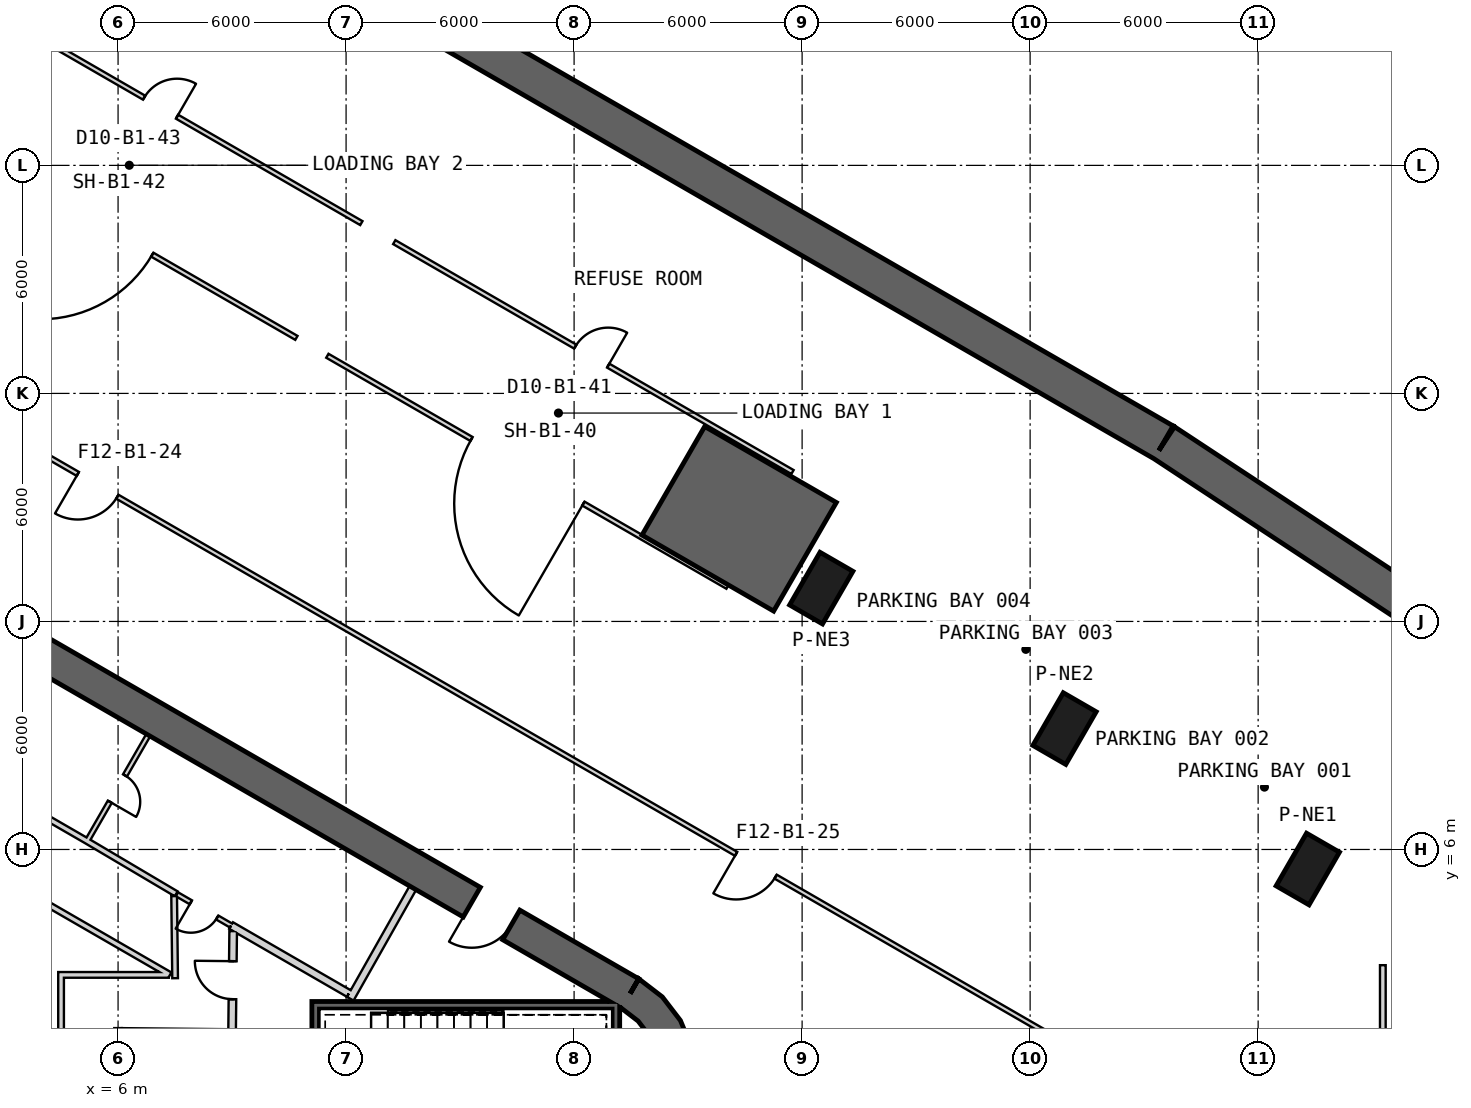
"""IFC4 building model, lengths in metres.
Left out: names, types, materials, properties, quantities, classifications, styles, units other than length and angle.
Written with IfcOpenShell. Run it as: python <this file> out.ifc"""

import sys

from ifc_helpers import new_model, si_unit, direction, frame, frame_2d, origin, origin_2d, place, context, subcontext, project, spatial, polyline, rectangle, outline, extrude, element, fill, save


model = new_model("IFC4")
c1 = context("Model", 3, precision=1e-05, world=origin(), true_north=direction((0.0, 1.0)))
c2 = subcontext(c1, "Body", "Model", "MODEL_VIEW")
j1 = project(units=[si_unit("LENGTHUNIT", "METRE"), si_unit("PLANEANGLEUNIT", "RADIAN")], contexts=[c1])
p1 = place(None, origin())
s1 = spatial("IfcSite", under=j1, at=p1, CompositionType="ELEMENT")
p2 = place(p1, origin())
s2 = spatial("IfcBuilding", under=s1, at=p2, CompositionType="ELEMENT")
p3 = place(p2, frame((0.0, 0.0, -5.5)))
s3 = spatial("IfcBuildingStorey", under=s2, at=p3, CompositionType="ELEMENT", Elevation=-5.5)
p4 = place(p3, frame((-2.547, 37.518, 0.0), z_axis=(0.0, 0.0, 1.0), x_axis=(0.866165180358, -0.499757821684, 0.0)))
e1 = element("IfcWall", 1, at=p4, inside=s3, PredefinedType="SHEAR", context=c2, shape_type="SweptSolid", body=[
    extrude(rectangle(XDim=41.631, YDim=1.0, at=frame_2d((20.815, 0.0))), origin(), (0.0, 0.0, 1.0), 5.5),
])
p5 = place(p3, frame((33.525, 16.705, 0.0), z_axis=(0.0, 0.0, 1.0), x_axis=(0.834958566613, -0.550312812898, 0.0)))
e2 = element("IfcWall", 2, at=p5, inside=s3, PredefinedType="SHEAR", context=c2, shape_type="SweptSolid", body=[
    extrude(rectangle(XDim=14.086, YDim=1.0, at=frame_2d((7.043, 0.0))), origin(), (0.0, 0.0, 1.0), 5.5),
])
for number, where, z_axis, x_axis in (
    (3, (37.306, 5.485, 0.0), (0.0, 0.0, 1.0), (0.5, 0.866, 0.0)),
    (4, (30.905, 9.181, 0.0), (0.0, 0.0, 1.0), (0.5, 0.866, 0.0)),
    (5, (24.504, 12.876, 0.0), (0.0, 0.0, 1.0), (0.5, 0.866, 0.0)),
):
    element("IfcColumn", number, at=place(p3, frame(where, z_axis=z_axis, x_axis=x_axis)), inside=s3, PredefinedType="COLUMN", context=c2, shape_type="SweptSolid", body=[
        extrude(rectangle(XDim=1.6, YDim=1.0, at=origin_2d()), origin(), (0.0, 0.0, 1.0), 5.5),
    ])
p6 = place(p3, frame((19.475, 2.208, 0.0), z_axis=(0.0, 0.0, 1.0), x_axis=(-0.866028369851, 0.499994862586, 0.0)))
e6 = element("IfcWall", 6, at=p6, inside=s3, PredefinedType="SHEAR", context=c2, shape_type="SweptSolid", body=[
    extrude(rectangle(XDim=31.523, YDim=0.9, at=frame_2d((15.762, 0.0))), origin(), (0.0, 0.0, 1.0), 5.5),
])
p7 = place(p6, frame((3.612, 0.0, 0.0)))
e7 = element("IfcOpeningElement", 7, at=p7, cuts=e6, PredefinedType="OPENING", context=c2, shape_type="SweptSolid", body=[
    extrude(rectangle(XDim=1.2, YDim=2.4, at=frame_2d((0.6, 1.2))), frame((0.0, 0.46, 0.0), z_axis=(0.0, -1.0, 0.0), x_axis=(1.0, 0.0, 0.0)), (0.0, 0.0, 1.0), 0.92),
])
p8 = place(p6, frame((26.712, 0.0, 0.0)))
e8 = element("IfcOpeningElement", 8, at=p8, cuts=e6, PredefinedType="OPENING", context=c2, shape_type="SweptSolid", body=[
    extrude(rectangle(XDim=1.2, YDim=2.4, at=frame_2d((0.6, 1.2))), frame((0.0, 0.46, 0.0), z_axis=(0.0, -1.0, 0.0), x_axis=(1.0, 0.0, 0.0)), (0.0, 0.0, 1.0), 0.92),
])
p9 = place(p3, origin())
e9 = element("IfcWall", 9, at=p9, inside=s3, PredefinedType="SHEAR", context=c2, shape_type="SweptSolid", body=[
    extrude(outline(polyline([(19.7, -2.598), (20.321, -2.121), (20.798, -1.5), (21.098, -0.777), (21.2, 0.0), (21.098, 0.777), (20.798, 1.5), (20.321, 2.121), (19.7, 2.598), (19.25, 1.819), (19.685, 1.485), (20.019, 1.05), (20.229, 0.543), (20.3, 0.0), (20.229, -0.543), (20.019, -1.05), (19.685, -1.485), (19.25, -1.819), (19.7, -2.598)])), origin(), (0.0, 0.0, 1.0), 5.5),
])
p10 = place(p3, origin())
e10 = element("IfcWall", 10, at=p10, inside=s3, PredefinedType="SHEAR", context=c2, shape_type="SweptSolid", body=[
    extrude(outline(polyline([(24.901, 15.13), (21.437, 17.13), (19.787, 14.272), (23.251, 12.272), (24.901, 15.13)])), origin(), (0.0, 0.0, 1.0), 5.5),
])
p11 = place(p3, frame((19.2, 1.9, -0.4), z_axis=(0.0, 0.0, 1.0), x_axis=(-1.0, 0.0, 0.0)))
e11 = element("IfcWall", 11, at=p11, inside=s3, PredefinedType="SHEAR", context=c2, shape_type="SweptSolid", body=[
    extrude(rectangle(XDim=8.1, YDim=0.2, at=frame_2d((4.05, 0.0))), origin(), (0.0, 0.0, 1.0), 5.5),
])
p12 = place(p3, frame((19.1, -2.0, -0.4), z_axis=(0.0, 0.0, 1.0), x_axis=(0.0, 1.0, 0.0)))
e12 = element("IfcWall", 12, at=p12, inside=s3, PredefinedType="SHEAR", context=c2, shape_type="SweptSolid", body=[
    extrude(rectangle(XDim=3.8, YDim=0.2, at=frame_2d((1.9, 0.0))), origin(), (0.0, 0.0, 1.0), 5.5),
])
p13 = place(p3, frame((11.2, -1.8, -0.4), z_axis=(0.0, 0.0, 1.0), x_axis=(0.0, 1.0, 0.0)))
e13 = element("IfcWall", 13, at=p13, inside=s3, PredefinedType="SHEAR", context=c2, shape_type="SweptSolid", body=[
    extrude(rectangle(XDim=3.6, YDim=0.2, at=frame_2d((1.8, 0.0))), origin(), (0.0, 0.0, 1.0), 5.5),
])
p14 = place(p13, frame((1.25, 0.0, 0.4)))
e14 = element("IfcOpeningElement", 14, at=p14, cuts=e13, PredefinedType="OPENING", context=c2, shape_type="SweptSolid", body=[
    extrude(rectangle(XDim=1.1, YDim=2.1, at=frame_2d((0.55, 1.05))), frame((0.0, 0.11, 0.0), z_axis=(0.0, -1.0, 0.0), x_axis=(1.0, 0.0, 0.0)), (0.0, 0.0, 1.0), 0.22),
])
p15 = place(p3, frame((6.0, -1.1, 0.0), z_axis=(0.0, 0.0, 1.0), x_axis=(0.0, 1.0, 0.0)))
e15 = element("IfcWall", 15, at=p15, inside=s3, PredefinedType="PLUMBINGWALL", context=c2, shape_type="SweptSolid", body=[
    extrude(rectangle(XDim=2.4, YDim=0.2, at=frame_2d((1.2, 0.0))), origin(), (0.0, 0.0, 1.0), 5.1),
])
p16 = place(p3, frame((9.1, 1.169, 0.0), z_axis=(0.0, 0.0, 1.0), x_axis=(-0.99994990606, 0.010009264196, 0.0)))
e16 = element("IfcWall", 16, at=p16, inside=s3, PredefinedType="PLUMBINGWALL", context=c2, shape_type="SweptSolid", body=[
    extrude(rectangle(XDim=3.0, YDim=0.2, at=frame_2d((1.5, 0.0))), origin(), (0.0, 0.0, 1.0), 5.1),
])
p17 = place(p3, frame((6.795, 9.01, 0.0), z_axis=(0.0, 0.0, 1.0), x_axis=(-0.499984717929, -0.866034226713, 0.0)))
e17 = element("IfcWall", 17, at=p17, inside=s3, PredefinedType="PARTITIONING", context=c2, shape_type="SweptSolid", body=[
    extrude(rectangle(XDim=3.25, YDim=0.12, at=frame_2d((1.625, 0.0))), origin(), (0.0, 0.0, 1.0), 5.1),
])
p18 = place(p17, frame((1.225, 0.0, 0.0)))
e18 = element("IfcOpeningElement", 18, at=p18, cuts=e17, PredefinedType="OPENING", context=c2, shape_type="SweptSolid", body=[
    extrude(rectangle(XDim=0.8, YDim=2.1, at=frame_2d((0.4, 1.05))), frame((0.0, 0.07, 0.0), z_axis=(0.0, -1.0, 0.0), x_axis=(1.0, 0.0, 0.0)), (0.0, 0.0, 1.0), 0.14),
])
p19 = place(p3, frame((12.11, 2.073, 0.0), z_axis=(0.0, 0.0, 1.0), x_axis=(0.49196600604, 0.870614408852, 0.0)))
e19 = element("IfcWall", 19, at=p19, inside=s3, PredefinedType="PARTITIONING", context=c2, shape_type="SweptSolid", body=[
    extrude(rectangle(XDim=3.35, YDim=0.2, at=frame_2d((1.675, 0.0))), origin(), (0.0, 0.0, 1.0), 5.1),
])
p20 = place(p3, frame((8.974, 3.999, 0.0), z_axis=(0.0, 0.0, 1.0), x_axis=(0.86601284211, -0.500021756827, 0.0)))
e20 = element("IfcWall", 20, at=p20, inside=s3, PredefinedType="PARTITIONING", context=c2, shape_type="SweptSolid", body=[
    extrude(rectangle(XDim=3.577, YDim=0.2, at=frame_2d((1.789, 0.0))), origin(), (0.0, 0.0, 1.0), 5.1),
])
p21 = place(p3, frame((5.159, 6.236, 0.0), z_axis=(0.0, 0.0, 1.0), x_axis=(0.860550523279, -0.509365091938, 0.0)))
e21 = element("IfcWall", 21, at=p21, inside=s3, PredefinedType="PLUMBINGWALL", context=c2, shape_type="SweptSolid", body=[
    extrude(rectangle(XDim=2.755, YDim=0.15, at=frame_2d((1.377, 0.0))), origin(), (0.0, 0.0, 1.0), 5.1),
])
p22 = place(p3, frame((7.55, 4.821, 0.0), z_axis=(0.0, 0.0, 1.0), x_axis=(0.866069384335, -0.499923815713, 0.0)))
e22 = element("IfcWall", 22, at=p22, inside=s3, PredefinedType="PARTITIONING", context=c2, shape_type="SweptSolid", body=[
    extrude(rectangle(XDim=1.644, YDim=0.12, at=frame_2d((0.822, 0.0))), origin(), (0.0, 0.0, 1.0), 5.1),
])
p23 = place(p22, frame((0.422, 0.0, 0.0)))
e23 = element("IfcOpeningElement", 23, at=p23, cuts=e22, PredefinedType="OPENING", context=c2, shape_type="SweptSolid", body=[
    extrude(rectangle(XDim=0.8, YDim=2.1, at=frame_2d((0.4, 1.05))), frame((0.0, 0.07, 0.0), z_axis=(0.0, -1.0, 0.0), x_axis=(1.0, 0.0, 0.0)), (0.0, 0.0, 1.0), 0.14),
])
p24 = place(p3, frame((5.159, 6.236, 0.0), z_axis=(0.0, 0.0, 1.0), x_axis=(-0.866028230842, 0.499995103361, 0.0)))
e24 = element("IfcWall", 24, at=p24, inside=s3, PredefinedType="PLUMBINGWALL", context=c2, shape_type="SweptSolid", body=[
    extrude(rectangle(XDim=5.4, YDim=0.15, at=frame_2d((2.7, 0.0))), origin(), (0.0, 0.0, 1.0), 5.1),
])
p25 = place(p24, frame((2.3, 0.0, 0.0)))
e25 = element("IfcOpeningElement", 25, at=p25, cuts=e24, PredefinedType="OPENING", context=c2, shape_type="SweptSolid", body=[
    extrude(rectangle(XDim=0.8, YDim=2.1, at=frame_2d((0.4, 1.05))), frame((0.0, 0.085, 0.0), z_axis=(0.0, -1.0, 0.0), x_axis=(1.0, 0.0, 0.0)), (0.0, 0.0, 1.0), 0.17),
])
p26 = place(p3, frame((9.001, 1.27, 0.0), z_axis=(0.0, 0.0, 1.0), x_axis=(0.010780534828, 0.999941888346, 0.0)))
e26 = element("IfcWall", 26, at=p26, inside=s3, PredefinedType="PARTITIONING", context=c2, shape_type="SweptSolid", body=[
    extrude(rectangle(XDim=2.582, YDim=0.2, at=frame_2d((1.291, 0.0))), origin(), (0.0, 0.0, 1.0), 5.1),
])
p27 = place(p26, frame((0.791, 0.0, 0.0)))
e27 = element("IfcOpeningElement", 27, at=p27, cuts=e26, PredefinedType="OPENING", context=c2, shape_type="SweptSolid", body=[
    extrude(rectangle(XDim=1.0, YDim=2.1, at=frame_2d((0.5, 1.05))), frame((0.0, 0.11, 0.0), z_axis=(0.0, -1.0, 0.0), x_axis=(1.0, 0.0, 0.0)), (0.0, 0.0, 1.0), 0.22),
])
p28 = place(p3, frame((7.367, 2.7, 0.0), z_axis=(0.0, 0.0, 1.0), x_axis=(-0.866027158831, 0.499996960157, 0.0)))
e28 = element("IfcWall", 28, at=p28, inside=s3, PredefinedType="PLUMBINGWALL", context=c2, shape_type="SweptSolid", body=[
    extrude(rectangle(XDim=10.06, YDim=0.15, at=frame_2d((5.03, 0.0))), origin(), (0.0, 0.0, 1.0), 5.1),
])
p29 = place(p3, frame((7.501, 2.613, 0.0), z_axis=(0.0, 0.0, 1.0), x_axis=(-0.011734691853, 0.999931146133, 0.0)))
e29 = element("IfcWall", 29, at=p29, inside=s3, PredefinedType="PLUMBINGWALL", context=c2, shape_type="SweptSolid", body=[
    extrude(rectangle(XDim=2.164, YDim=0.15, at=frame_2d((1.082, 0.0))), origin(), (0.0, 0.0, 1.0), 5.1),
])
p30 = place(p3, frame((4.425, 2.7, 0.0), z_axis=(0.0, 0.0, 1.0), x_axis=(1.0, 0.0, 0.0)))
e30 = element("IfcWall", 30, at=p30, inside=s3, PredefinedType="PLUMBINGWALL", context=c2, shape_type="SweptSolid", body=[
    extrude(rectangle(XDim=2.912, YDim=0.15, at=frame_2d((1.456, 0.0))), origin(), (0.0, 0.0, 1.0), 5.1),
])
p31 = place(p3, frame((4.5, 0.85, 0.0), z_axis=(0.0, 0.0, 1.0), x_axis=(0.0, 1.0, 0.0)))
e31 = element("IfcWall", 31, at=p31, inside=s3, PredefinedType="PLUMBINGWALL", context=c2, shape_type="SweptSolid", body=[
    extrude(rectangle(XDim=1.775, YDim=0.15, at=frame_2d((0.887, 0.0))), origin(), (0.0, 0.0, 1.0), 5.1),
])
p32 = place(p3, frame((32.38, 0.046, 0.0), z_axis=(0.0, 0.0, 1.0), x_axis=(-0.86611360534, 0.499847199298, 0.0)))
e32 = element("IfcWall", 32, at=p32, inside=s3, PredefinedType="PARTITIONING", context=c2, shape_type="SweptSolid", body=[
    extrude(rectangle(XDim=56.078, YDim=0.12, at=frame_2d((28.039, 0.0))), origin(), (0.0, 0.0, 1.0), 4.07),
])
p33 = place(p32, frame((30.481, 0.0, 0.0)))
e33 = element("IfcOpeningElement", 33, at=p33, cuts=e32, PredefinedType="OPENING", context=c2, shape_type="SweptSolid", body=[
    extrude(rectangle(XDim=1.2, YDim=2.4, at=frame_2d((0.6, 1.2))), frame((0.0, 0.07, 0.0), z_axis=(0.0, -1.0, 0.0), x_axis=(1.0, 0.0, 0.0)), (0.0, 0.0, 1.0), 0.14),
])
p34 = place(p32, frame((10.481, 0.0, 0.0)))
e34 = element("IfcOpeningElement", 34, at=p34, cuts=e32, PredefinedType="OPENING", context=c2, shape_type="SweptSolid", body=[
    extrude(rectangle(XDim=1.2, YDim=2.4, at=frame_2d((0.6, 1.2))), frame((0.0, 0.07, 0.0), z_axis=(0.0, -1.0, 0.0), x_axis=(1.0, 0.0, 0.0)), (0.0, 0.0, 1.0), 0.14),
])
p35 = place(p32, frame((45.282, 0.0, 0.0)))
e35 = element("IfcOpeningElement", 35, at=p35, cuts=e32, PredefinedType="OPENING", context=c2, shape_type="SweptSolid", body=[
    extrude(rectangle(XDim=0.9, YDim=2.1, at=frame_2d((0.45, 1.05))), frame((0.0, 0.07, 0.0), z_axis=(0.0, -1.0, 0.0), x_axis=(1.0, 0.0, 0.0)), (0.0, 0.0, 1.0), 0.14),
])
p36 = place(p32, frame((52.061, 0.0, 0.0)))
e36 = element("IfcOpeningElement", 36, at=p36, cuts=e32, PredefinedType="OPENING", context=c2, shape_type="SweptSolid", body=[
    extrude(rectangle(XDim=1.0, YDim=2.1, at=frame_2d((0.5, 1.05))), frame((0.0, 0.07, 0.0), z_axis=(0.0, -1.0, 0.0), x_axis=(1.0, 0.0, 0.0)), (0.0, 0.0, 1.0), 0.14),
])
p37 = place(p3, frame((39.281, -2.955, 0.0), z_axis=(0.0, 0.0, 1.0), x_axis=(0.0, 1.0, 0.0)))
e37 = element("IfcWall", 37, at=p37, inside=s3, PredefinedType="PLUMBINGWALL", context=c2, shape_type="SweptSolid", body=[
    extrude(rectangle(XDim=5.911, YDim=0.15, at=frame_2d((2.955, 0.0))), origin(), (0.0, 0.0, 1.0), 4.07),
])
p38 = place(p37, frame((0.583, 0.0, 0.0)))
e38 = element("IfcOpeningElement", 38, at=p38, cuts=e37, PredefinedType="OPENING", context=c2, shape_type="SweptSolid", body=[
    extrude(rectangle(XDim=0.8, YDim=2.1, at=frame_2d((0.4, 1.05))), frame((0.0, 0.085, 0.0), z_axis=(0.0, -1.0, 0.0), x_axis=(1.0, 0.0, 0.0)), (0.0, 0.0, 1.0), 0.17),
])
p39 = place(p3, frame((22.038, 12.911, 0.0), z_axis=(0.0, 0.0, 1.0), x_axis=(-0.866020417952, 0.500008635616, 0.0)))
e39 = element("IfcWall", 39, at=p39, inside=s3, PredefinedType="PARTITIONING", context=c2, shape_type="SweptSolid", body=[
    extrude(rectangle(XDim=12.16, YDim=0.12, at=frame_2d((6.08, 0.0))), origin(), (0.0, 0.0, 1.0), 5.1),
])
p40 = place(p39, frame((4.38, 0.0, 0.0)))
e40 = element("IfcOpeningElement", 40, at=p40, cuts=e39, PredefinedType="OPENING", context=c2, shape_type="SweptSolid", body=[
    extrude(rectangle(XDim=3.4, YDim=4.0, at=frame_2d((1.7, 2.0))), frame((0.0, 0.07, 0.0), z_axis=(0.0, -1.0, 0.0), x_axis=(1.0, 0.0, 0.0)), (0.0, 0.0, 1.0), 0.14),
])
p41 = place(p3, frame((10.693, 19.461, 0.0), z_axis=(0.0, 0.0, 1.0), x_axis=(-0.866020417952, 0.500008635616, 0.0)))
e41 = element("IfcWall", 41, at=p41, inside=s3, PredefinedType="PARTITIONING", context=c2, shape_type="SweptSolid", body=[
    extrude(rectangle(XDim=12.16, YDim=0.12, at=frame_2d((6.08, 0.0))), origin(), (0.0, 0.0, 1.0), 5.1),
])
p42 = place(p41, frame((4.38, 0.0, 0.0)))
e42 = element("IfcOpeningElement", 42, at=p42, cuts=e41, PredefinedType="OPENING", context=c2, shape_type="SweptSolid", body=[
    extrude(rectangle(XDim=3.4, YDim=4.0, at=frame_2d((1.7, 2.0))), frame((0.0, 0.07, 0.0), z_axis=(0.0, -1.0, 0.0), x_axis=(1.0, 0.0, 0.0)), (0.0, 0.0, 1.0), 0.14),
])
p43 = place(p3, frame((1.923, 28.531, 0.0), z_axis=(0.0, 0.0, 1.0), x_axis=(0.866034387366, -0.499984439657, 0.0)))
e43 = element("IfcWall", 43, at=p43, inside=s3, PredefinedType="PARTITIONING", context=c2, shape_type="SweptSolid", body=[
    extrude(rectangle(XDim=12.1, YDim=0.12, at=frame_2d((6.05, 0.0))), origin(), (0.0, 0.0, 1.0), 5.1),
])
p44 = place(p43, frame((5.5, 0.0, 0.0)))
e44 = element("IfcOpeningElement", 44, at=p44, cuts=e43, PredefinedType="OPENING", context=c2, shape_type="SweptSolid", body=[
    extrude(rectangle(XDim=1.0, YDim=2.1, at=frame_2d((0.5, 1.05))), frame((0.0, 0.07, 0.0), z_axis=(0.0, -1.0, 0.0), x_axis=(1.0, 0.0, 0.0)), (0.0, 0.0, 1.0), 0.14),
])
p45 = place(p3, frame((13.268, 21.981, 0.0), z_axis=(0.0, 0.0, 1.0), x_axis=(0.866020606328, -0.500008309346, 0.0)))
e45 = element("IfcWall", 45, at=p45, inside=s3, PredefinedType="PARTITIONING", context=c2, shape_type="SweptSolid", body=[
    extrude(rectangle(XDim=12.1, YDim=0.12, at=frame_2d((6.05, 0.0))), origin(), (0.0, 0.0, 1.0), 5.1),
])
p46 = place(p45, frame((5.5, 0.0, 0.0)))
e46 = element("IfcOpeningElement", 46, at=p46, cuts=e45, PredefinedType="OPENING", context=c2, shape_type="SweptSolid", body=[
    extrude(rectangle(XDim=1.0, YDim=2.1, at=frame_2d((0.5, 1.05))), frame((0.0, 0.07, 0.0), z_axis=(0.0, -1.0, 0.0), x_axis=(1.0, 0.0, 0.0)), (0.0, 0.0, 1.0), 0.14),
])
p47 = place(p27, origin())
e47 = element("IfcDoor", 47, at=p47, inside=s3, OperationType="SINGLE_SWING_RIGHT", PredefinedType="USERDEFINED", context=c2, shape_type="SweptSolid", body=[
    extrude(rectangle(XDim=1.0, YDim=2.1, at=frame_2d((0.5, 1.05))), frame((0.0, 0.025, 0.0), z_axis=(0.0, -1.0, 0.0), x_axis=(1.0, 0.0, 0.0)), (0.0, 0.0, 1.0), 0.05),
])
fill(e27, e47)
p48 = place(p23, origin())
e48 = element("IfcDoor", 48, at=p48, inside=s3, OperationType="SINGLE_SWING_LEFT", PredefinedType="USERDEFINED", context=c2, shape_type="SweptSolid", body=[
    extrude(rectangle(XDim=0.8, YDim=2.1, at=frame_2d((0.4, 1.05))), frame((0.0, 0.025, 0.0), z_axis=(0.0, -1.0, 0.0), x_axis=(1.0, 0.0, 0.0)), (0.0, 0.0, 1.0), 0.05),
])
fill(e23, e48)
p49 = place(p33, origin())
e49 = element("IfcDoor", 49, at=p49, inside=s3, OperationType="SINGLE_SWING_RIGHT", PredefinedType="USERDEFINED", context=c2, shape_type="SweptSolid", body=[
    extrude(rectangle(XDim=1.2, YDim=2.4, at=frame_2d((0.6, 1.2))), frame((0.0, 0.025, 0.0), z_axis=(0.0, -1.0, 0.0), x_axis=(1.0, 0.0, 0.0)), (0.0, 0.0, 1.0), 0.05),
])
fill(e33, e49)
p50 = place(p34, origin())
e50 = element("IfcDoor", 50, at=p50, inside=s3, OperationType="SINGLE_SWING_RIGHT", PredefinedType="USERDEFINED", context=c2, shape_type="SweptSolid", body=[
    extrude(rectangle(XDim=1.2, YDim=2.4, at=frame_2d((0.6, 1.2))), frame((0.0, 0.025, 0.0), z_axis=(0.0, -1.0, 0.0), x_axis=(1.0, 0.0, 0.0)), (0.0, 0.0, 1.0), 0.05),
])
fill(e34, e50)
p51 = place(p40, origin())
e51 = element("IfcDoor", 51, at=p51, inside=s3, OperationType="SINGLE_SWING_LEFT", PredefinedType="NOTDEFINED", context=c2, shape_type="SweptSolid", body=[
    extrude(rectangle(XDim=3.4, YDim=4.0, at=frame_2d((1.7, 2.0))), frame((0.0, 0.025, 0.0), z_axis=(0.0, -1.0, 0.0), x_axis=(1.0, 0.0, 0.0)), (0.0, 0.0, 1.0), 0.05),
])
fill(e40, e51)
p52 = place(p46, origin())
e52 = element("IfcDoor", 52, at=p52, inside=s3, OperationType="SINGLE_SWING_RIGHT", PredefinedType="NOTDEFINED", context=c2, shape_type="SweptSolid", body=[
    extrude(rectangle(XDim=1.0, YDim=2.1, at=frame_2d((0.5, 1.05))), frame((0.0, 0.025, 0.0), z_axis=(0.0, -1.0, 0.0), x_axis=(1.0, 0.0, 0.0)), (0.0, 0.0, 1.0), 0.05),
])
fill(e46, e52)
p53 = place(p42, origin())
e53 = element("IfcDoor", 53, at=p53, inside=s3, OperationType="SINGLE_SWING_RIGHT", PredefinedType="NOTDEFINED", context=c2, shape_type="SweptSolid", body=[
    extrude(rectangle(XDim=3.4, YDim=4.0, at=frame_2d((1.7, 2.0))), frame((0.0, 0.025, 0.0), z_axis=(0.0, -1.0, 0.0), x_axis=(1.0, 0.0, 0.0)), (0.0, 0.0, 1.0), 0.05),
])
fill(e42, e53)
p54 = place(p44, origin())
e54 = element("IfcDoor", 54, at=p54, inside=s3, OperationType="SINGLE_SWING_RIGHT", PredefinedType="NOTDEFINED", context=c2, shape_type="SweptSolid", body=[
    extrude(rectangle(XDim=1.0, YDim=2.1, at=frame_2d((0.5, 1.05))), frame((0.0, 0.025, 0.0), z_axis=(0.0, -1.0, 0.0), x_axis=(1.0, 0.0, 0.0)), (0.0, 0.0, 1.0), 0.05),
])
fill(e44, e54)
p55 = place(p18, origin())
e55 = element("IfcDoor", 55, at=p55, inside=s3, OperationType="SINGLE_SWING_RIGHT", PredefinedType="USERDEFINED", context=c2, shape_type="SweptSolid", body=[
    extrude(rectangle(XDim=0.8, YDim=2.1, at=frame_2d((0.4, 1.05))), frame((0.0, 0.025, 0.0), z_axis=(0.0, -1.0, 0.0), x_axis=(1.0, 0.0, 0.0)), (0.0, 0.0, 1.0), 0.05),
])
fill(e18, e55)
p56 = place(p7, origin())
e56 = element("IfcDoor", 56, at=p56, inside=s3, OperationType="SINGLE_SWING_RIGHT", PredefinedType="USERDEFINED", context=c2, shape_type="SweptSolid", body=[
    extrude(rectangle(XDim=1.2, YDim=2.4, at=frame_2d((0.6, 1.2))), frame((0.0, 0.025, 0.0), z_axis=(0.0, -1.0, 0.0), x_axis=(1.0, 0.0, 0.0)), (0.0, 0.0, 1.0), 0.05),
])
fill(e7, e56)
save(model, sys.argv[1])
